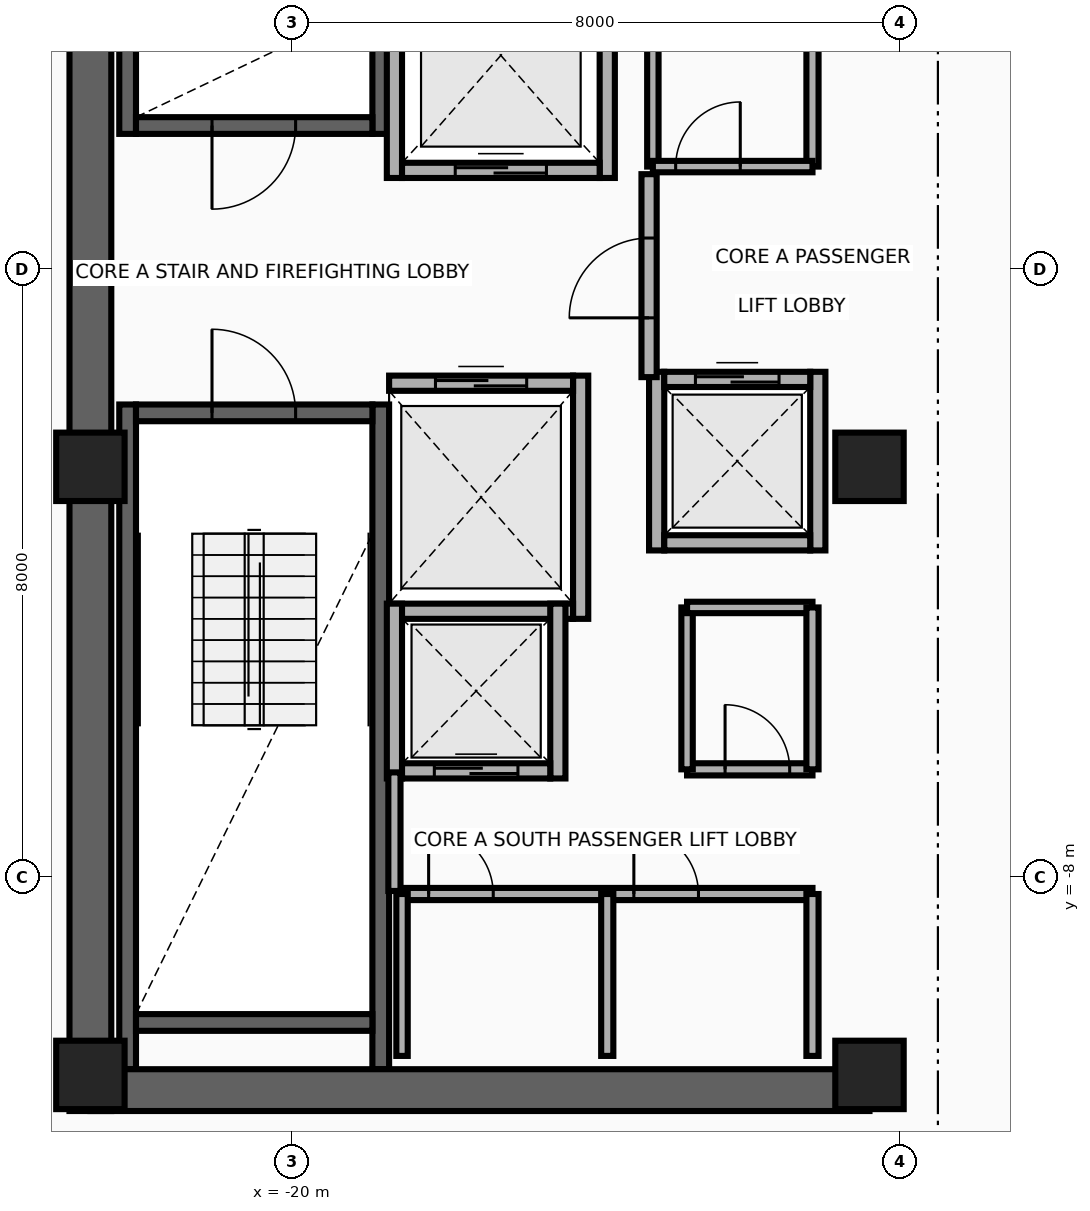
"""IFC4 building model, lengths in metres.
Left out: names, types, materials, properties, quantities, classifications, styles, units other than length and angle.
Written with IfcOpenShell. Run it as: python <this file> out.ifc"""

import sys

from ifc_helpers import new_model, si_unit, direction, frame, frame_2d, origin, origin_2d, place, context, subcontext, project, spatial, rectangle, extrude, source, transform, mapped, element, fill, save


model = new_model("IFC4")
c1 = context("Model", 3, precision=1e-05, world=origin(), true_north=direction((0.0, 1.0)))
c2 = subcontext(c1, "Body", "Model", "MODEL_VIEW")
j1 = project(units=[si_unit("LENGTHUNIT", "METRE"), si_unit("PLANEANGLEUNIT", "RADIAN")], contexts=[c1])
p1 = place(None, origin())
s1 = spatial("IfcSite", under=j1, at=p1, CompositionType="ELEMENT")
p2 = place(p1, origin())
s2 = spatial("IfcBuilding", under=s1, at=p2, CompositionType="ELEMENT")
p3 = place(p2, frame((0.0, 0.0, 216.0)))
s3 = spatial("IfcBuildingStorey", under=s2, at=p3, CompositionType="ELEMENT", Elevation=216.0)
for number, where, z_axis, x_axis in (
    (1, (-22.16, 1.78, 0.0), (0.0, 0.0, 1.0), (0.0, 1.0, 0.0)),
    (2, (-18.83, 1.78, 0.0), (0.0, 0.0, 1.0), (0.0, 1.0, 0.0)),
):
    element("IfcWall", number, at=place(p3, frame(where, z_axis=z_axis, x_axis=x_axis)), inside=s3, PredefinedType="SHEAR", context=c2, shape_type="SweptSolid", body=[
        extrude(rectangle(XDim=8.745, YDim=0.22, at=frame_2d((4.373, 0.0))), origin(), (0.0, 0.0, 1.0), 3.26),
    ])
p4 = place(p3, frame((-22.05, 1.89, 0.0), z_axis=(0.0, 0.0, 1.0), x_axis=(1.0, 0.0, 0.0)))
e3 = element("IfcWall", 3, at=p4, inside=s3, PredefinedType="SHEAR", context=c2, shape_type="SweptSolid", body=[
    extrude(rectangle(XDim=3.11, YDim=0.22, at=frame_2d((1.555, 0.0))), origin(), (0.0, 0.0, 1.0), 3.26),
])
p5 = place(p4, frame((1.0, 0.0, 0.0)))
e4 = element("IfcOpeningElement", 4, at=p5, cuts=e3, PredefinedType="OPENING", context=c2, shape_type="SweptSolid", body=[
    extrude(rectangle(XDim=1.1, YDim=2.15, at=frame_2d((0.55, 1.075))), frame((0.0, 0.125, 0.0), z_axis=(0.0, -1.0, 0.0), x_axis=(1.0, 0.0, 0.0)), (0.0, 0.0, 1.0), 0.25),
])
for number, where, z_axis, x_axis in (
    (5, (-22.16, -10.525, 0.0), (0.0, 0.0, 1.0), (0.0, 1.0, 0.0)),
    (6, (-18.83, -10.525, 0.0), (0.0, 0.0, 1.0), (0.0, 1.0, 0.0)),
):
    element("IfcWall", number, at=place(p3, frame(where, z_axis=z_axis, x_axis=x_axis)), inside=s3, PredefinedType="SHEAR", context=c2, shape_type="SweptSolid", body=[
        extrude(rectangle(XDim=8.745, YDim=0.22, at=frame_2d((4.373, 0.0))), origin(), (0.0, 0.0, 1.0), 3.26),
    ])
p6 = place(p3, frame((-22.05, -9.91, 0.0), z_axis=(0.0, 0.0, 1.0), x_axis=(1.0, 0.0, 0.0)))
e7 = element("IfcWall", 7, at=p6, inside=s3, PredefinedType="SHEAR", context=c2, shape_type="SweptSolid", body=[
    extrude(rectangle(XDim=3.11, YDim=0.22, at=frame_2d((1.555, 0.0))), origin(), (0.0, 0.0, 1.0), 3.26),
])
p7 = place(p3, frame((-22.05, -1.89, 0.0), z_axis=(0.0, 0.0, 1.0), x_axis=(1.0, 0.0, 0.0)))
e8 = element("IfcWall", 8, at=p7, inside=s3, PredefinedType="SHEAR", context=c2, shape_type="SweptSolid", body=[
    extrude(rectangle(XDim=3.11, YDim=0.22, at=frame_2d((1.555, 0.0))), origin(), (0.0, 0.0, 1.0), 3.26),
])
p8 = place(p7, frame((1.0, 0.0, 0.0)))
e9 = element("IfcOpeningElement", 9, at=p8, cuts=e8, PredefinedType="OPENING", context=c2, shape_type="SweptSolid", body=[
    extrude(rectangle(XDim=1.1, YDim=2.15, at=frame_2d((0.55, 1.075))), frame((0.0, 0.125, 0.0), z_axis=(0.0, -1.0, 0.0), x_axis=(1.0, 0.0, 0.0)), (0.0, 0.0, 1.0), 0.25),
])
p9 = place(p3, frame((-22.65, -11.075, 0.0), z_axis=(0.0, 0.0, 1.0), x_axis=(0.0, 1.0, 0.0)))
e10 = element("IfcWall", 10, at=p9, inside=s3, PredefinedType="SHEAR", context=c2, shape_type="SweptSolid", body=[
    extrude(rectangle(XDim=22.15, YDim=0.55, at=frame_2d((11.075, 0.0))), origin(), (0.0, 0.0, 1.0), 3.26),
])
p10 = place(p3, frame((-22.65, -10.8, 0.0), z_axis=(0.0, 0.0, 1.0), x_axis=(1.0, 0.0, 0.0)))
e11 = element("IfcWall", 11, at=p10, inside=s3, PredefinedType="SHEAR", context=c2, shape_type="SweptSolid", body=[
    extrude(rectangle(XDim=10.25, YDim=0.55, at=frame_2d((5.125, 0.0))), origin(), (0.0, 0.0, 1.0), 3.26),
])
m1 = source(origin(), c2, "Body", "SweptSolid", [
    extrude(rectangle(XDim=0.9, YDim=0.9, at=origin_2d()), origin(), (0.0, 0.0, 1.0), 3.5),
])
for number, where, z_axis, x_axis in (
    (12, (-22.65, -10.6, 0.0), (0.0, 0.0, 1.0), (1.0, 0.0, 0.0)),
    (13, (-12.4, -10.6, 0.0), (0.0, 0.0, 1.0), (1.0, 0.0, 0.0)),
    (14, (-22.65, -2.6, 0.0), (0.0, 0.0, 1.0), (1.0, 0.0, 0.0)),
    (15, (-12.4, -2.6, 0.0), (0.0, 0.0, 1.0), (1.0, 0.0, 0.0)),
):
    element("IfcColumn", number, at=place(p3, frame(where, z_axis=z_axis, x_axis=x_axis)), inside=s3, PredefinedType="COLUMN", context=c2, shape_type="MappedRepresentation", body=[
        mapped(m1, transform((0.0, 0.0, 0.0), x_axis=(1.0, 0.0, 0.0), y_axis=(0.0, 1.0, 0.0), z_axis=(0.0, 0.0, 1.0), scale=1.0)),
    ])
for number, where, z_axis, x_axis in (
    (16, (-18.65, 1.2, 0.0), (0.0, 0.0, 1.0), (0.0, 1.0, 0.0)),
    (17, (-15.85, 1.2, 0.0), (0.0, 0.0, 1.0), (0.0, 1.0, 0.0)),
):
    element("IfcWall", number, at=place(p3, frame(where, z_axis=z_axis, x_axis=x_axis)), inside=s3, PredefinedType="MOVABLE", context=c2, shape_type="SweptSolid", body=[
        extrude(rectangle(XDim=3.225, YDim=0.2, at=frame_2d((1.613, 0.0))), origin(), (0.0, 0.0, 1.0), 3.26),
    ])
p11 = place(p3, frame((-18.55, 1.3, 0.0), z_axis=(0.0, 0.0, 1.0), x_axis=(1.0, 0.0, 0.0)))
e18 = element("IfcWall", 18, at=p11, inside=s3, PredefinedType="MOVABLE", context=c2, shape_type="SweptSolid", body=[
    extrude(rectangle(XDim=2.6, YDim=0.2, at=frame_2d((1.3, 0.0))), origin(), (0.0, 0.0, 1.0), 3.26),
])
p12 = place(p11, frame((0.7, 0.0, 0.0)))
e19 = element("IfcOpeningElement", 19, at=p12, cuts=e18, PredefinedType="OPENING", context=c2, shape_type="SweptSolid", body=[
    extrude(rectangle(XDim=1.2, YDim=2.1, at=frame_2d((0.6, 1.05))), frame((0.0, 0.115, 0.0), z_axis=(0.0, -1.0, 0.0), x_axis=(1.0, 0.0, 0.0)), (0.0, 0.0, 1.0), 0.23),
])
p13 = place(p3, frame((-16.2, -4.6, 0.0), z_axis=(0.0, 0.0, 1.0), x_axis=(0.0, 1.0, 0.0)))
e20 = element("IfcWall", 20, at=p13, inside=s3, PredefinedType="MOVABLE", context=c2, shape_type="SweptSolid", body=[
    extrude(rectangle(XDim=3.2, YDim=0.2, at=frame_2d((1.6, 0.0))), origin(), (0.0, 0.0, 1.0), 3.26),
])
p14 = place(p3, frame((-18.72, -4.5, 0.0), z_axis=(0.0, 0.0, 1.0), x_axis=(1.0, 0.0, 0.0)))
e21 = element("IfcWall", 21, at=p14, inside=s3, PredefinedType="MOVABLE", context=c2, shape_type="SweptSolid", body=[
    extrude(rectangle(XDim=2.42, YDim=0.2, at=frame_2d((1.21, 0.0))), origin(), (0.0, 0.0, 1.0), 3.26),
])
p15 = place(p3, frame((-18.72, -1.5, 0.0), z_axis=(0.0, 0.0, 1.0), x_axis=(1.0, 0.0, 0.0)))
e22 = element("IfcWall", 22, at=p15, inside=s3, PredefinedType="MOVABLE", context=c2, shape_type="SweptSolid", body=[
    extrude(rectangle(XDim=2.42, YDim=0.2, at=frame_2d((1.21, 0.0))), origin(), (0.0, 0.0, 1.0), 3.26),
])
p16 = place(p15, frame((0.61, 0.0, 0.0)))
e23 = element("IfcOpeningElement", 23, at=p16, cuts=e22, PredefinedType="OPENING", context=c2, shape_type="SweptSolid", body=[
    extrude(rectangle(XDim=1.2, YDim=2.1, at=frame_2d((0.6, 1.05))), frame((0.0, 0.115, 0.0), z_axis=(0.0, -1.0, 0.0), x_axis=(1.0, 0.0, 0.0)), (0.0, 0.0, 1.0), 0.23),
])
for number, where, z_axis, x_axis in (
    (24, (-18.65, -6.7, 0.0), (0.0, 0.0, 1.0), (0.0, 1.0, 0.0)),
    (25, (-16.5, -6.7, 0.0), (0.0, 0.0, 1.0), (0.0, 1.0, 0.0)),
):
    element("IfcWall", number, at=place(p3, frame(where, z_axis=z_axis, x_axis=x_axis)), inside=s3, PredefinedType="MOVABLE", context=c2, shape_type="SweptSolid", body=[
        extrude(rectangle(XDim=2.3, YDim=0.2, at=frame_2d((1.15, 0.0))), origin(), (0.0, 0.0, 1.0), 3.26),
    ])
p17 = place(p3, frame((-18.55, -6.6, 0.0), z_axis=(0.0, 0.0, 1.0), x_axis=(1.0, 0.0, 0.0)))
e26 = element("IfcWall", 26, at=p17, inside=s3, PredefinedType="MOVABLE", context=c2, shape_type="SweptSolid", body=[
    extrude(rectangle(XDim=1.95, YDim=0.2, at=frame_2d((0.975, 0.0))), origin(), (0.0, 0.0, 1.0), 3.26),
])
p18 = place(p17, frame((0.425, 0.0, 0.0)))
e27 = element("IfcOpeningElement", 27, at=p18, cuts=e26, PredefinedType="OPENING", context=c2, shape_type="SweptSolid", body=[
    extrude(rectangle(XDim=1.1, YDim=2.1, at=frame_2d((0.55, 1.05))), frame((0.0, 0.115, 0.0), z_axis=(0.0, -1.0, 0.0), x_axis=(1.0, 0.0, 0.0)), (0.0, 0.0, 1.0), 0.23),
])
for number, where, z_axis, x_axis in (
    (28, (-15.2, -3.7, 0.0), (0.0, 0.0, 1.0), (0.0, 1.0, 0.0)),
    (29, (-13.08, -3.7, 0.0), (0.0, 0.0, 1.0), (0.0, 1.0, 0.0)),
):
    element("IfcWall", number, at=place(p3, frame(where, z_axis=z_axis, x_axis=x_axis)), inside=s3, PredefinedType="MOVABLE", context=c2, shape_type="SweptSolid", body=[
        extrude(rectangle(XDim=2.35, YDim=0.2, at=frame_2d((1.175, 0.0))), origin(), (0.0, 0.0, 1.0), 3.26),
    ])
p19 = place(p3, frame((-15.1, -3.6, 0.0), z_axis=(0.0, 0.0, 1.0), x_axis=(1.0, 0.0, 0.0)))
e30 = element("IfcWall", 30, at=p19, inside=s3, PredefinedType="MOVABLE", context=c2, shape_type="SweptSolid", body=[
    extrude(rectangle(XDim=1.92, YDim=0.2, at=frame_2d((0.96, 0.0))), origin(), (0.0, 0.0, 1.0), 3.26),
])
p20 = place(p3, frame((-15.1, -1.45, 0.0), z_axis=(0.0, 0.0, 1.0), x_axis=(1.0, 0.0, 0.0)))
e31 = element("IfcWall", 31, at=p20, inside=s3, PredefinedType="MOVABLE", context=c2, shape_type="SweptSolid", body=[
    extrude(rectangle(XDim=1.92, YDim=0.2, at=frame_2d((0.96, 0.0))), origin(), (0.0, 0.0, 1.0), 3.26),
])
p21 = place(p20, frame((0.41, 0.0, 0.0)))
e32 = element("IfcOpeningElement", 32, at=p21, cuts=e31, PredefinedType="OPENING", context=c2, shape_type="SweptSolid", body=[
    extrude(rectangle(XDim=1.1, YDim=2.1, at=frame_2d((0.55, 1.05))), frame((0.0, 0.115, 0.0), z_axis=(0.0, -1.0, 0.0), x_axis=(1.0, 0.0, 0.0)), (0.0, 0.0, 1.0), 0.23),
])
p22 = place(p3, frame((-15.3, -1.42, 0.0), z_axis=(0.0, 0.0, 1.0), x_axis=(0.0, 1.0, 0.0)))
e33 = element("IfcWall", 33, at=p22, inside=s3, PredefinedType="PARTITIONING", context=c2, shape_type="SweptSolid", body=[
    extrude(rectangle(XDim=2.67, YDim=0.2, at=frame_2d((1.335, 0.0))), origin(), (0.0, 0.0, 1.0), 3.26),
])
p23 = place(p22, frame((0.78, 0.0, 0.0)))
e34 = element("IfcOpeningElement", 34, at=p23, cuts=e33, PredefinedType="OPENING", context=c2, shape_type="SweptSolid", body=[
    extrude(rectangle(XDim=1.05, YDim=2.15, at=frame_2d((0.525, 1.075))), frame((0.0, 0.115, 0.0), z_axis=(0.0, -1.0, 0.0), x_axis=(1.0, 0.0, 0.0)), (0.0, 0.0, 1.0), 0.23),
])
p24 = place(p3, frame((-18.65, -8.18, 0.0), z_axis=(0.0, 0.0, 1.0), x_axis=(0.0, 1.0, 0.0)))
e35 = element("IfcWall", 35, at=p24, inside=s3, PredefinedType="PARTITIONING", context=c2, shape_type="SweptSolid", body=[
    extrude(rectangle(XDim=1.56, YDim=0.16, at=frame_2d((0.78, 0.0))), origin(), (0.0, 0.0, 1.0), 3.26),
])
p25 = place(p3, frame((-18.55, -8.22, 0.0), z_axis=(0.0, 0.0, 1.0), x_axis=(1.0, 0.0, 0.0)))
e36 = element("IfcWall", 36, at=p25, inside=s3, PredefinedType="PARTITIONING", context=c2, shape_type="SweptSolid", body=[
    extrude(rectangle(XDim=5.4, YDim=0.16, at=frame_2d((2.7, 0.0))), origin(), (0.0, 0.0, 1.0), 3.26),
])
p26 = place(p25, frame((0.35, 0.0, 0.0)))
e37 = element("IfcOpeningElement", 37, at=p26, cuts=e36, PredefinedType="OPENING", context=c2, shape_type="SweptSolid", body=[
    extrude(rectangle(XDim=0.85, YDim=2.05, at=frame_2d((0.425, 1.025))), frame((0.0, 0.095, 0.0), z_axis=(0.0, -1.0, 0.0), x_axis=(1.0, 0.0, 0.0)), (0.0, 0.0, 1.0), 0.19),
])
p27 = place(p25, frame((3.05, 0.0, 0.0)))
e38 = element("IfcOpeningElement", 38, at=p27, cuts=e36, PredefinedType="OPENING", context=c2, shape_type="SweptSolid", body=[
    extrude(rectangle(XDim=0.85, YDim=2.05, at=frame_2d((0.425, 1.025))), frame((0.0, 0.095, 0.0), z_axis=(0.0, -1.0, 0.0), x_axis=(1.0, 0.0, 0.0)), (0.0, 0.0, 1.0), 0.19),
])
p28 = place(p3, frame((-18.55, -10.35, 0.0), z_axis=(0.0, 0.0, 1.0), x_axis=(0.0, 1.0, 0.0)))
e39 = element("IfcWall", 39, at=p28, inside=s3, PredefinedType="PARTITIONING", context=c2, shape_type="SweptSolid", body=[
    extrude(rectangle(XDim=2.13, YDim=0.15, at=frame_2d((1.065, 0.0))), origin(), (0.0, 0.0, 1.0), 3.26),
])
for number, where, z_axis, x_axis in (
    (40, (-13.15, -10.35, 0.0), (0.0, 0.0, 1.0), (0.0, 1.0, 0.0)),
    (41, (-15.85, -10.35, 0.0), (0.0, 0.0, 1.0), (0.0, 1.0, 0.0)),
):
    element("IfcWall", number, at=place(p3, frame(where, z_axis=z_axis, x_axis=x_axis)), inside=s3, PredefinedType="PARTITIONING", context=c2, shape_type="SweptSolid", body=[
        extrude(rectangle(XDim=2.13, YDim=0.16, at=frame_2d((1.065, 0.0))), origin(), (0.0, 0.0, 1.0), 3.26),
    ])
p29 = place(p3, frame((-14.8, -6.58, 0.0), z_axis=(0.0, 0.0, 1.0), x_axis=(1.0, 0.0, 0.0)))
e42 = element("IfcWall", 42, at=p29, inside=s3, PredefinedType="PARTITIONING", context=c2, shape_type="SweptSolid", body=[
    extrude(rectangle(XDim=1.65, YDim=0.16, at=frame_2d((0.825, 0.0))), origin(), (0.0, 0.0, 1.0), 3.26),
])
p30 = place(p29, frame((0.5, 0.0, 0.0)))
e43 = element("IfcOpeningElement", 43, at=p30, cuts=e42, PredefinedType="OPENING", context=c2, shape_type="SweptSolid", body=[
    extrude(rectangle(XDim=0.85, YDim=2.05, at=frame_2d((0.425, 1.025))), frame((0.0, 0.095, 0.0), z_axis=(0.0, -1.0, 0.0), x_axis=(1.0, 0.0, 0.0)), (0.0, 0.0, 1.0), 0.19),
])
p31 = place(p3, frame((-14.8, -6.58, 0.0), z_axis=(0.0, 0.0, 1.0), x_axis=(0.0, 1.0, 0.0)))
e44 = element("IfcWall", 44, at=p31, inside=s3, PredefinedType="PARTITIONING", context=c2, shape_type="SweptSolid", body=[
    extrude(rectangle(XDim=2.13, YDim=0.15, at=frame_2d((1.065, 0.0))), origin(), (0.0, 0.0, 1.0), 3.26),
])
p32 = place(p3, frame((-14.8, -4.45, 0.0), z_axis=(0.0, 0.0, 1.0), x_axis=(1.0, 0.0, 0.0)))
e45 = element("IfcWall", 45, at=p32, inside=s3, PredefinedType="PARTITIONING", context=c2, shape_type="SweptSolid", body=[
    extrude(rectangle(XDim=1.65, YDim=0.15, at=frame_2d((0.825, 0.0))), origin(), (0.0, 0.0, 1.0), 3.26),
])
p33 = place(p3, frame((-13.15, -6.58, 0.0), z_axis=(0.0, 0.0, 1.0), x_axis=(0.0, 1.0, 0.0)))
e46 = element("IfcWall", 46, at=p33, inside=s3, PredefinedType="PARTITIONING", context=c2, shape_type="SweptSolid", body=[
    extrude(rectangle(XDim=2.13, YDim=0.16, at=frame_2d((1.065, 0.0))), origin(), (0.0, 0.0, 1.0), 3.26),
])
p34 = place(p3, frame((-13.15, 1.35, 0.0), z_axis=(0.0, 0.0, 1.0), x_axis=(0.0, 1.0, 0.0)))
e47 = element("IfcWall", 47, at=p34, inside=s3, PredefinedType="PARTITIONING", context=c2, shape_type="SweptSolid", body=[
    extrude(rectangle(XDim=1.95, YDim=0.16, at=frame_2d((0.975, 0.0))), origin(), (0.0, 0.0, 1.0), 3.26),
])
p35 = place(p3, frame((-15.25, 1.35, 0.0), z_axis=(0.0, 0.0, 1.0), x_axis=(0.0, 1.0, 0.0)))
e48 = element("IfcWall", 48, at=p35, inside=s3, PredefinedType="PARTITIONING", context=c2, shape_type="SweptSolid", body=[
    extrude(rectangle(XDim=1.95, YDim=0.15, at=frame_2d((0.975, 0.0))), origin(), (0.0, 0.0, 1.0), 3.26),
])
p36 = place(p3, frame((-15.25, 1.35, 0.0), z_axis=(0.0, 0.0, 1.0), x_axis=(1.0, 0.0, 0.0)))
e49 = element("IfcWall", 49, at=p36, inside=s3, PredefinedType="PARTITIONING", context=c2, shape_type="SweptSolid", body=[
    extrude(rectangle(XDim=2.1, YDim=0.15, at=frame_2d((1.05, 0.0))), origin(), (0.0, 0.0, 1.0), 3.26),
])
p37 = place(p36, frame((0.3, 0.0, 0.0)))
e50 = element("IfcOpeningElement", 50, at=p37, cuts=e49, PredefinedType="OPENING", context=c2, shape_type="SweptSolid", body=[
    extrude(rectangle(XDim=0.85, YDim=2.05, at=frame_2d((0.425, 1.025))), frame((0.0, 0.09, 0.0), z_axis=(0.0, -1.0, 0.0), x_axis=(1.0, 0.0, 0.0)), (0.0, 0.0, 1.0), 0.18),
])
p38 = place(p12, origin())
e51 = element("IfcDoor", 51, at=p38, inside=s3, OperationType="DOUBLE_DOOR_SLIDING", PredefinedType="DOOR", context=c2, shape_type="SweptSolid", body=[
    extrude(rectangle(XDim=1.2, YDim=2.1, at=frame_2d((0.6, 1.05))), frame((0.0, 0.025, 0.0), z_axis=(0.0, -1.0, 0.0), x_axis=(1.0, 0.0, 0.0)), (0.0, 0.0, 1.0), 0.05),
])
fill(e19, e51)
p39 = place(p16, origin())
e52 = element("IfcDoor", 52, at=p39, inside=s3, OperationType="DOUBLE_DOOR_SLIDING", PredefinedType="DOOR", context=c2, shape_type="SweptSolid", body=[
    extrude(rectangle(XDim=1.2, YDim=2.1, at=frame_2d((0.6, 1.05))), frame((0.0, 0.025, 0.0), z_axis=(0.0, -1.0, 0.0), x_axis=(1.0, 0.0, 0.0)), (0.0, 0.0, 1.0), 0.05),
])
fill(e23, e52)
p40 = place(p18, origin())
e53 = element("IfcDoor", 53, at=p40, inside=s3, OperationType="DOUBLE_DOOR_SLIDING", PredefinedType="DOOR", context=c2, shape_type="SweptSolid", body=[
    extrude(rectangle(XDim=1.1, YDim=2.1, at=frame_2d((0.55, 1.05))), frame((0.0, 0.025, 0.0), z_axis=(0.0, -1.0, 0.0), x_axis=(1.0, 0.0, 0.0)), (0.0, 0.0, 1.0), 0.05),
])
fill(e27, e53)
p41 = place(p21, origin())
e54 = element("IfcDoor", 54, at=p41, inside=s3, OperationType="DOUBLE_DOOR_SLIDING", PredefinedType="DOOR", context=c2, shape_type="SweptSolid", body=[
    extrude(rectangle(XDim=1.1, YDim=2.1, at=frame_2d((0.55, 1.05))), frame((0.0, 0.025, 0.0), z_axis=(0.0, -1.0, 0.0), x_axis=(1.0, 0.0, 0.0)), (0.0, 0.0, 1.0), 0.05),
])
fill(e32, e54)
p42 = place(p23, origin())
e55 = element("IfcDoor", 55, at=p42, inside=s3, OperationType="SINGLE_SWING_RIGHT", PredefinedType="DOOR", context=c2, shape_type="SweptSolid", body=[
    extrude(rectangle(XDim=1.05, YDim=2.15, at=frame_2d((0.525, 1.075))), frame((0.0, 0.025, 0.0), z_axis=(0.0, -1.0, 0.0), x_axis=(1.0, 0.0, 0.0)), (0.0, 0.0, 1.0), 0.05),
])
fill(e34, e55)
p43 = place(p5, frame((1.1, 0.0, 0.0), z_axis=(0.0, 0.0, 1.0), x_axis=(-1.0, 0.0, 0.0)))
e56 = element("IfcDoor", 56, at=p43, inside=s3, OperationType="SINGLE_SWING_LEFT", PredefinedType="DOOR", context=c2, shape_type="SweptSolid", body=[
    extrude(rectangle(XDim=1.1, YDim=2.15, at=frame_2d((0.55, 1.075))), frame((0.0, 0.025, 0.0), z_axis=(0.0, -1.0, 0.0), x_axis=(1.0, 0.0, 0.0)), (0.0, 0.0, 1.0), 0.05),
])
fill(e4, e56)
p44 = place(p8, origin())
e57 = element("IfcDoor", 57, at=p44, inside=s3, OperationType="SINGLE_SWING_RIGHT", PredefinedType="DOOR", context=c2, shape_type="SweptSolid", body=[
    extrude(rectangle(XDim=1.1, YDim=2.15, at=frame_2d((0.55, 1.075))), frame((0.0, 0.025, 0.0), z_axis=(0.0, -1.0, 0.0), x_axis=(1.0, 0.0, 0.0)), (0.0, 0.0, 1.0), 0.05),
])
fill(e9, e57)
p45 = place(p26, origin())
e58 = element("IfcDoor", 58, at=p45, inside=s3, OperationType="SINGLE_SWING_LEFT", PredefinedType="DOOR", context=c2, shape_type="SweptSolid", body=[
    extrude(rectangle(XDim=0.85, YDim=2.05, at=frame_2d((0.425, 1.025))), frame((0.0, 0.025, 0.0), z_axis=(0.0, -1.0, 0.0), x_axis=(1.0, 0.0, 0.0)), (0.0, 0.0, 1.0), 0.05),
])
fill(e37, e58)
p46 = place(p27, origin())
e59 = element("IfcDoor", 59, at=p46, inside=s3, OperationType="SINGLE_SWING_RIGHT", PredefinedType="DOOR", context=c2, shape_type="SweptSolid", body=[
    extrude(rectangle(XDim=0.85, YDim=2.05, at=frame_2d((0.425, 1.025))), frame((0.0, 0.025, 0.0), z_axis=(0.0, -1.0, 0.0), x_axis=(1.0, 0.0, 0.0)), (0.0, 0.0, 1.0), 0.05),
])
fill(e38, e59)
p47 = place(p30, origin())
e60 = element("IfcDoor", 60, at=p47, inside=s3, OperationType="SINGLE_SWING_LEFT", PredefinedType="DOOR", context=c2, shape_type="SweptSolid", body=[
    extrude(rectangle(XDim=0.85, YDim=2.05, at=frame_2d((0.425, 1.025))), frame((0.0, 0.025, 0.0), z_axis=(0.0, -1.0, 0.0), x_axis=(1.0, 0.0, 0.0)), (0.0, 0.0, 1.0), 0.05),
])
fill(e43, e60)
p48 = place(p37, origin())
e61 = element("IfcDoor", 61, at=p48, inside=s3, OperationType="SINGLE_SWING_RIGHT", PredefinedType="DOOR", context=c2, shape_type="SweptSolid", body=[
    extrude(rectangle(XDim=0.85, YDim=2.05, at=frame_2d((0.425, 1.025))), frame((0.0, 0.025, 0.0), z_axis=(0.0, -1.0, 0.0), x_axis=(1.0, 0.0, 0.0)), (0.0, 0.0, 1.0), 0.05),
])
fill(e50, e61)
save(model, sys.argv[1])
